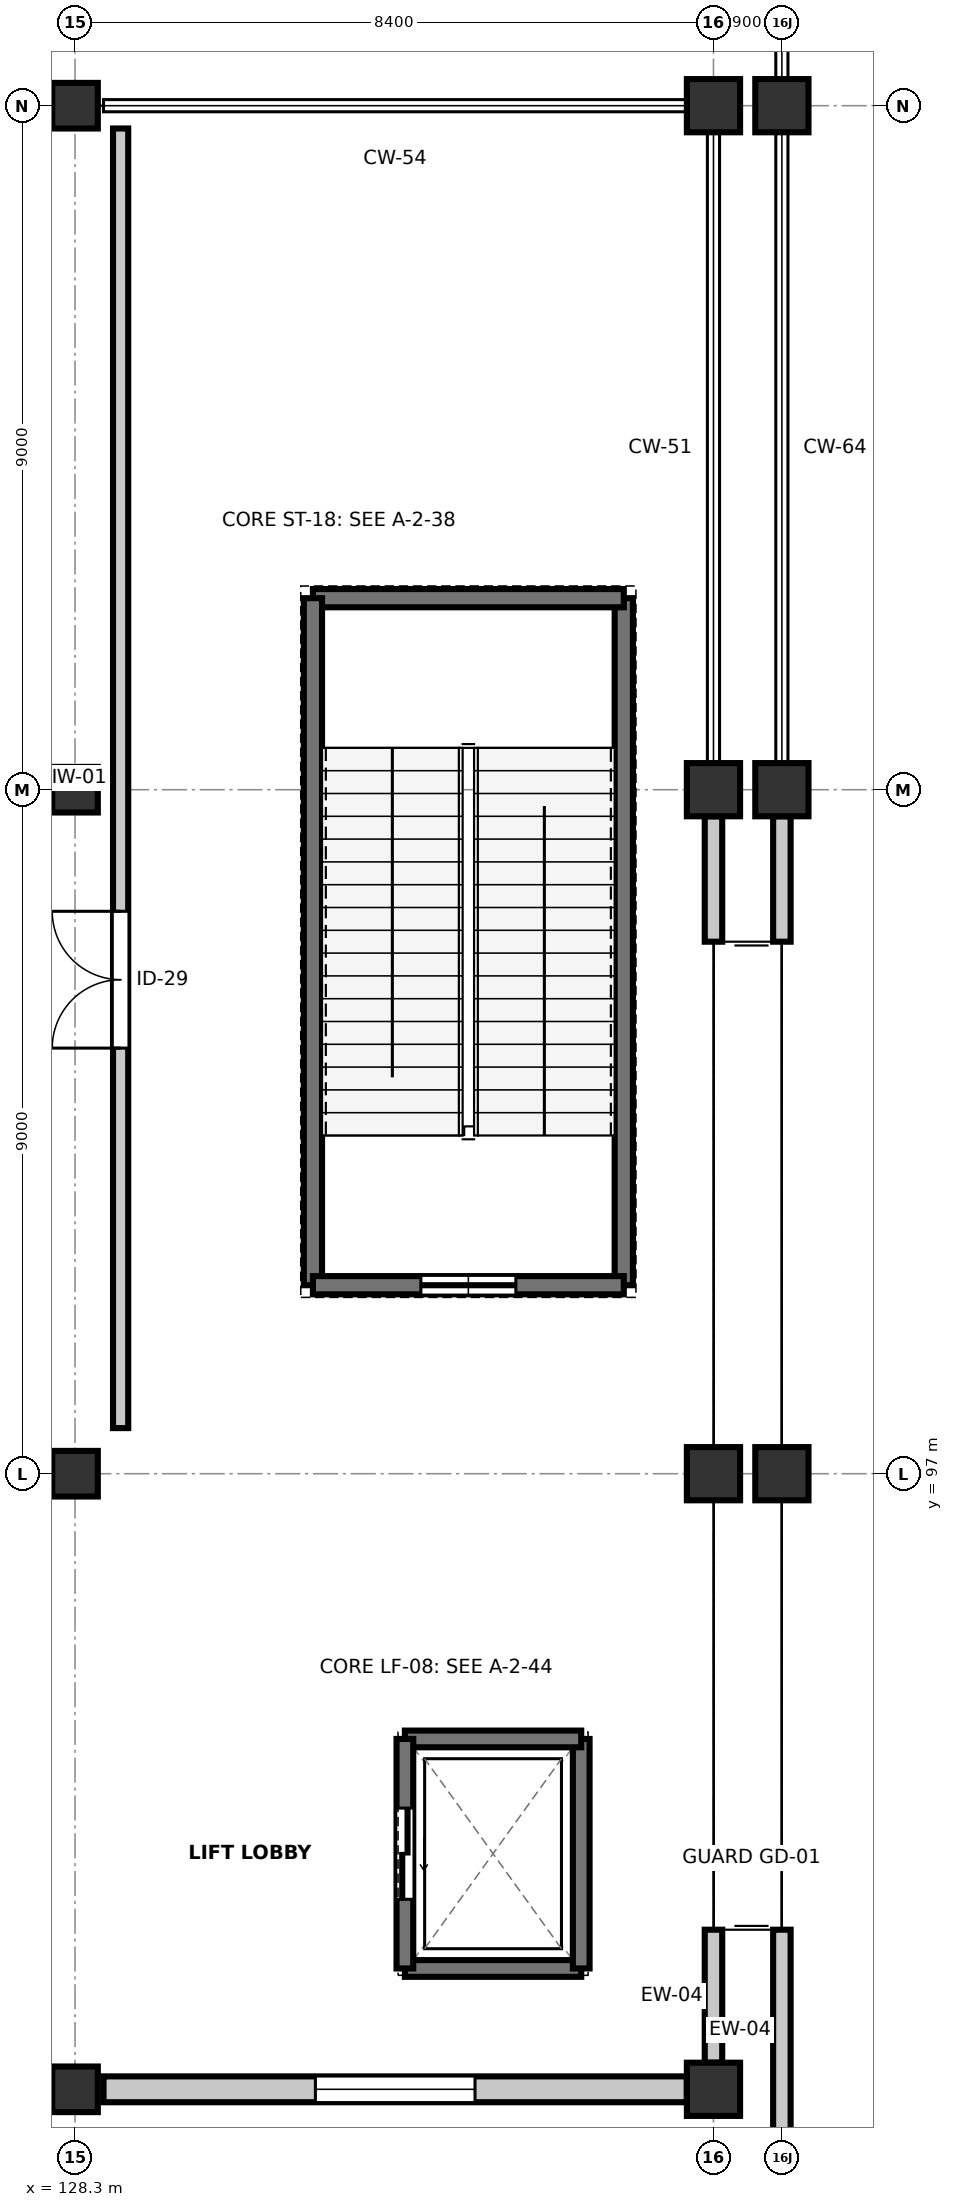
"""IFC4 building model, lengths in metres.
Left out: names, types, materials, properties, quantities, classifications, styles, units other than length and angle.
Written with IfcOpenShell. Run it as: python <this file> out.ifc"""

import sys

from ifc_helpers import new_model, si_unit, direction, frame, frame_2d, origin, origin_2d, place, context, subcontext, project, spatial, rectangle, circle, extrude, element, fill, save


model = new_model("IFC4")
c1 = context("Model", 3, precision=1e-05, world=origin(), true_north=direction((0.0, 1.0)))
c2 = subcontext(c1, "Body", "Model", "MODEL_VIEW")
j1 = project(units=[si_unit("LENGTHUNIT", "METRE"), si_unit("PLANEANGLEUNIT", "RADIAN")], contexts=[c1])
p1 = place(None, origin())
s1 = spatial("IfcSite", under=j1, at=p1, CompositionType="ELEMENT")
p2 = place(p1, origin())
s2 = spatial("IfcBuilding", under=s1, at=p2, CompositionType="ELEMENT")
p3 = place(p2, frame((0.0, 0.0, 19.2)))
s3 = spatial("IfcBuildingStorey", under=s2, at=p3, CompositionType="ELEMENT", Elevation=19.2)
for number, where, z_axis, x_axis in (
    (1, (128.3, 88.9, 0.0), (0.0, 0.0, 1.0), (1.0, 0.0, 0.0)),
    (2, (128.3, 97.0, 0.0), (0.0, 0.0, 1.0), (1.0, 0.0, 0.0)),
    (3, (128.3, 106.0, 0.0), (0.0, 0.0, 1.0), (1.0, 0.0, 0.0)),
    (4, (128.3, 115.0, 0.0), (0.0, 0.0, 1.0), (1.0, 0.0, 0.0)),
):
    element("IfcColumn", number, at=place(p3, frame(where, z_axis=z_axis, x_axis=x_axis)), inside=s3, PredefinedType="COLUMN", context=c2, shape_type="SweptSolid", body=[
        extrude(circle(Radius=0.375, at=origin_2d()), origin(), (0.0, 0.0, 1.0), 5.4),
    ])
for number, where, z_axis, x_axis in (
    (5, (136.7, 88.9, 0.0), (0.0, 0.0, 1.0), (1.0, 0.0, 0.0)),
    (6, (136.7, 97.0, 0.0), (0.0, 0.0, 1.0), (1.0, 0.0, 0.0)),
    (7, (136.7, 106.0, 0.0), (0.0, 0.0, 1.0), (1.0, 0.0, 0.0)),
    (8, (136.7, 115.0, 0.0), (0.0, 0.0, 1.0), (1.0, 0.0, 0.0)),
    (9, (137.6, 97.0, 0.0), (0.0, 0.0, 1.0), (1.0, 0.0, 0.0)),
    (10, (137.6, 106.0, 0.0), (0.0, 0.0, 1.0), (1.0, 0.0, 0.0)),
    (11, (137.6, 115.0, 0.0), (0.0, 0.0, 1.0), (1.0, 0.0, 0.0)),
):
    element("IfcColumn", number, at=place(p3, frame(where, z_axis=z_axis, x_axis=x_axis)), inside=s3, PredefinedType="COLUMN", context=c2, shape_type="SweptSolid", body=[
        extrude(rectangle(XDim=0.7, YDim=0.7, at=origin_2d()), origin(), (0.0, 0.0, 1.0), 5.4),
    ])
p4 = place(p3, frame((128.675, 88.9, 0.0), z_axis=(0.0, 0.0, 1.0), x_axis=(1.0, 0.0, 0.0)))
e12 = element("IfcWall", 12, at=p4, inside=s3, PredefinedType="STANDARD", context=c2, shape_type="SweptSolid", body=[
    extrude(rectangle(XDim=7.675, YDim=0.34, at=frame_2d((3.837, 0.0))), origin(), (0.0, 0.0, 1.0), 4.551),
])
p5 = place(p4, frame((2.788, 0.0, 0.95)))
e13 = element("IfcOpeningElement", 13, at=p5, cuts=e12, PredefinedType="OPENING", context=c2, shape_type="SweptSolid", body=[
    extrude(rectangle(XDim=2.1, YDim=2.15, at=frame_2d((1.05, 1.075))), frame((0.0, 0.18, 0.0), z_axis=(0.0, -1.0, 0.0), x_axis=(1.0, 0.0, 0.0)), (0.0, 0.0, 1.0), 0.36),
])
p6 = place(p3, frame((136.7, 89.25, 0.0), z_axis=(0.0, 0.0, 1.0), x_axis=(0.0, 1.0, 0.0)))
e14 = element("IfcWall", 14, at=p6, inside=s3, PredefinedType="STANDARD", context=c2, shape_type="SweptSolid", body=[
    extrude(rectangle(XDim=1.75, YDim=0.23, at=frame_2d((0.875, 0.0))), origin(), (0.0, 0.0, 1.0), 4.657),
])
p7 = place(p3, frame((136.7, 104.0, 0.0), z_axis=(0.0, 0.0, 1.0), x_axis=(0.0, 1.0, 0.0)))
e15 = element("IfcWall", 15, at=p7, inside=s3, PredefinedType="STANDARD", context=c2, shape_type="SweptSolid", body=[
    extrude(rectangle(XDim=1.65, YDim=0.23, at=frame_2d((0.825, 0.0))), origin(), (0.0, 0.0, 1.0), 4.657),
])
p8 = place(p3, frame((137.6, 88.35, 0.0), z_axis=(0.0, 0.0, 1.0), x_axis=(0.0, 1.0, 0.0)))
e16 = element("IfcWall", 16, at=p8, inside=s3, PredefinedType="STANDARD", context=c2, shape_type="SweptSolid", body=[
    extrude(rectangle(XDim=2.65, YDim=0.23, at=frame_2d((1.325, 0.0))), origin(), (0.0, 0.0, 1.0), 4.551),
])
p9 = place(p3, frame((137.6, 104.0, 0.0), z_axis=(0.0, 0.0, 1.0), x_axis=(0.0, 1.0, 0.0)))
e17 = element("IfcWall", 17, at=p9, inside=s3, PredefinedType="STANDARD", context=c2, shape_type="SweptSolid", body=[
    extrude(rectangle(XDim=1.65, YDim=0.23, at=frame_2d((0.825, 0.0))), origin(), (0.0, 0.0, 1.0), 4.551),
])
p10 = place(p3, frame((135.52, 99.48, 0.0), z_axis=(0.0, 0.0, 1.0), x_axis=(0.0, 1.0, 0.0)))
e18 = element("IfcWall", 18, at=p10, inside=s3, PredefinedType="SHEAR", context=c2, shape_type="SweptSolid", body=[
    extrude(rectangle(XDim=9.04, YDim=0.24, at=frame_2d((4.52, 0.0))), origin(), (0.0, 0.0, 1.0), 5.16),
])
p11 = place(p3, frame((135.52, 108.52, 0.0), z_axis=(0.0, 0.0, 1.0), x_axis=(-1.0, 0.0, 0.0)))
e19 = element("IfcWall", 19, at=p11, inside=s3, PredefinedType="SHEAR", context=c2, shape_type="SweptSolid", body=[
    extrude(rectangle(XDim=4.09, YDim=0.24, at=frame_2d((2.045, 0.0))), origin(), (0.0, 0.0, 1.0), 5.16),
])
p12 = place(p3, frame((131.43, 108.52, 0.0), z_axis=(0.0, 0.0, 1.0), x_axis=(0.0, -1.0, 0.0)))
e20 = element("IfcWall", 20, at=p12, inside=s3, PredefinedType="SHEAR", context=c2, shape_type="SweptSolid", body=[
    extrude(rectangle(XDim=9.04, YDim=0.24, at=frame_2d((4.52, 0.0))), origin(), (0.0, 0.0, 1.0), 5.16),
])
p13 = place(p3, frame((131.43, 99.48, 0.0), z_axis=(0.0, 0.0, 1.0), x_axis=(1.0, 0.0, 0.0)))
e21 = element("IfcWall", 21, at=p13, inside=s3, PredefinedType="SHEAR", context=c2, shape_type="SweptSolid", body=[
    extrude(rectangle(XDim=4.09, YDim=0.24, at=frame_2d((2.045, 0.0))), origin(), (0.0, 0.0, 1.0), 5.16),
])
p14 = place(p13, frame((1.42, 0.0, 0.0)))
e22 = element("IfcOpeningElement", 22, at=p14, cuts=e21, PredefinedType="OPENING", context=c2, shape_type="SweptSolid", body=[
    extrude(rectangle(XDim=1.25, YDim=2.2, at=frame_2d((0.625, 1.1))), frame((0.0, 0.13, 0.0), z_axis=(0.0, -1.0, 0.0), x_axis=(1.0, 0.0, 0.0)), (0.0, 0.0, 1.0), 0.26),
])
p15 = place(p3, frame((132.64, 90.49, 0.0), z_axis=(0.0, 0.0, 1.0), x_axis=(1.0, 0.0, 0.0)))
e23 = element("IfcWall", 23, at=p15, inside=s3, PredefinedType="SHEAR", context=c2, shape_type="SweptSolid", body=[
    extrude(rectangle(XDim=2.32, YDim=0.22, at=frame_2d((1.16, 0.0))), origin(), (0.0, 0.0, 1.0), 5.16),
])
p16 = place(p3, frame((134.96, 90.49, 0.0), z_axis=(0.0, 0.0, 1.0), x_axis=(0.0, 1.0, 0.0)))
e24 = element("IfcWall", 24, at=p16, inside=s3, PredefinedType="SHEAR", context=c2, shape_type="SweptSolid", body=[
    extrude(rectangle(XDim=3.02, YDim=0.22, at=frame_2d((1.51, 0.0))), origin(), (0.0, 0.0, 1.0), 5.16),
])
p17 = place(p3, frame((134.96, 93.51, 0.0), z_axis=(0.0, 0.0, 1.0), x_axis=(-1.0, 0.0, 0.0)))
e25 = element("IfcWall", 25, at=p17, inside=s3, PredefinedType="SHEAR", context=c2, shape_type="SweptSolid", body=[
    extrude(rectangle(XDim=2.32, YDim=0.22, at=frame_2d((1.16, 0.0))), origin(), (0.0, 0.0, 1.0), 5.16),
])
p18 = place(p3, frame((132.64, 93.51, 0.0), z_axis=(0.0, 0.0, 1.0), x_axis=(0.0, -1.0, 0.0)))
e26 = element("IfcWall", 26, at=p18, inside=s3, PredefinedType="SHEAR", context=c2, shape_type="SweptSolid", body=[
    extrude(rectangle(XDim=3.02, YDim=0.22, at=frame_2d((1.51, 0.0))), origin(), (0.0, 0.0, 1.0), 5.16),
])
p19 = place(p18, frame((0.91, 0.0, 0.0)))
e27 = element("IfcOpeningElement", 27, at=p19, cuts=e26, PredefinedType="OPENING", context=c2, shape_type="SweptSolid", body=[
    extrude(rectangle(XDim=1.2, YDim=2.15, at=frame_2d((0.6, 1.075))), frame((0.0, 0.12, 0.0), z_axis=(0.0, -1.0, 0.0), x_axis=(1.0, 0.0, 0.0)), (0.0, 0.0, 1.0), 0.24),
])
p20 = place(p3, frame((128.9, 97.6, 0.0), z_axis=(0.0, 0.0, 1.0), x_axis=(0.0, 1.0, 0.0)))
e28 = element("IfcWall", 28, at=p20, inside=s3, PredefinedType="PARTITIONING", context=c2, shape_type="SweptSolid", body=[
    extrude(rectangle(XDim=17.1, YDim=0.2, at=frame_2d((8.55, 0.0))), origin(), (0.0, 0.0, 1.0), 4.695),
])
p21 = place(p20, frame((5.0, 0.0, 0.0)))
e29 = element("IfcOpeningElement", 29, at=p21, cuts=e28, PredefinedType="OPENING", context=c2, shape_type="SweptSolid", body=[
    extrude(rectangle(XDim=1.8, YDim=2.36, at=frame_2d((0.9, 1.18))), frame((0.0, 0.11, 0.0), z_axis=(0.0, -1.0, 0.0), x_axis=(1.0, 0.0, 0.0)), (0.0, 0.0, 1.0), 0.22),
])
p22 = place(p5, origin())
e30 = element("IfcWindow", 30, at=p22, inside=s3, PartitioningType="SINGLE_PANEL", PredefinedType="WINDOW", context=c2, shape_type="SweptSolid", body=[
    extrude(rectangle(XDim=2.1, YDim=2.15, at=frame_2d((1.05, 1.075))), frame((0.0, 0.03, 0.0), z_axis=(0.0, -1.0, 0.0), x_axis=(1.0, 0.0, 0.0)), (0.0, 0.0, 1.0), 0.06),
])
fill(e13, e30)
p23 = place(p14, origin())
e31 = element("IfcDoor", 31, at=p23, inside=s3, OperationType="SINGLE_SWING_RIGHT", PredefinedType="DOOR", context=c2, shape_type="SweptSolid", body=[
    extrude(rectangle(XDim=1.25, YDim=2.2, at=frame_2d((0.625, 1.1))), frame((0.0, 0.025, 0.0), z_axis=(0.0, -1.0, 0.0), x_axis=(1.0, 0.0, 0.0)), (0.0, 0.0, 1.0), 0.05),
])
fill(e22, e31)
p24 = place(p19, origin())
e32 = element("IfcDoor", 32, at=p24, inside=s3, OperationType="DOUBLE_DOOR_SLIDING", PredefinedType="DOOR", context=c2, shape_type="SweptSolid", body=[
    extrude(rectangle(XDim=1.2, YDim=2.15, at=frame_2d((0.6, 1.075))), frame((0.0, 0.025, 0.0), z_axis=(0.0, -1.0, 0.0), x_axis=(1.0, 0.0, 0.0)), (0.0, 0.0, 1.0), 0.05),
])
fill(e27, e32)
p25 = place(p21, origin())
e33 = element("IfcDoor", 33, at=p25, inside=s3, OperationType="DOUBLE_DOOR_SINGLE_SWING", PredefinedType="DOOR", context=c2, shape_type="SweptSolid", body=[
    extrude(rectangle(XDim=1.8, YDim=2.36, at=frame_2d((0.9, 1.18))), frame((0.0, 0.025, 0.0), z_axis=(0.0, -1.0, 0.0), x_axis=(1.0, 0.0, 0.0)), (0.0, 0.0, 1.0), 0.05),
])
fill(e29, e33)
save(model, sys.argv[1])
